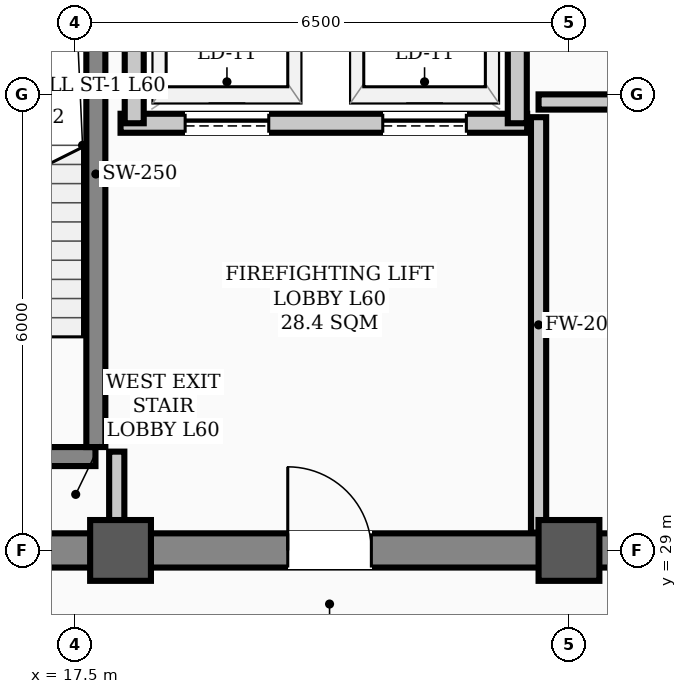
"""IFC4 building model, lengths in metres.
Left out: names, types, materials, properties, quantities, classifications, styles, units other than length and angle.
Written with IfcOpenShell. Run it as: python <this file> out.ifc"""

import sys

from ifc_helpers import new_model, si_unit, direction, frame, frame_2d, origin, origin_2d, place, context, subcontext, project, spatial, rectangle, hollow_rectangle, extrude, element, fill, save


model = new_model("IFC4")
c1 = context("Model", 3, precision=1e-05, world=origin(), true_north=direction((0.0, 1.0)))
c2 = subcontext(c1, "Body", "Model", "MODEL_VIEW")
j1 = project(units=[si_unit("LENGTHUNIT", "METRE"), si_unit("PLANEANGLEUNIT", "RADIAN")], contexts=[c1])
p1 = place(None, origin())
s1 = spatial("IfcSite", under=j1, at=p1, CompositionType="ELEMENT")
p2 = place(p1, origin())
s2 = spatial("IfcBuilding", under=s1, at=p2, CompositionType="ELEMENT")
p3 = place(p2, frame((0.0, 0.0, 242.3)))
s3 = spatial("IfcBuildingStorey", under=s2, at=p3, CompositionType="ELEMENT", Elevation=242.3)
for number, where, z_axis, x_axis in (
    (1, (18.1, 29.0, 0.0), (0.0, 0.0, 1.0), (1.0, 0.0, 0.0)),
    (2, (24.0, 29.0, 0.0), (0.0, 0.0, 1.0), (1.0, 0.0, 0.0)),
):
    element("IfcColumn", number, at=place(p3, frame(where, z_axis=z_axis, x_axis=x_axis)), inside=s3, PredefinedType="COLUMN", context=c2, shape_type="SweptSolid", body=[
        extrude(hollow_rectangle(XDim=0.8, YDim=0.8, WallThickness=0.032, InnerFilletRadius=0.016, OuterFilletRadius=0.048, at=origin_2d()), origin(), (0.0, 0.0, 1.0), 3.9),
    ])
p4 = place(p3, frame((13.5, 29.0, 0.0), z_axis=(0.0, 0.0, 1.0), x_axis=(1.0, 0.0, 0.0)))
e3 = element("IfcWall", 3, at=p4, inside=s3, PredefinedType="SHEAR", context=c2, shape_type="SweptSolid", body=[
    extrude(rectangle(XDim=30.5, YDim=0.45, at=frame_2d((15.25, 0.0))), origin(), (0.0, 0.0, 1.0), 3.72),
])
p5 = place(p4, frame((1.75, 0.0, 0.0)))
e4 = element("IfcOpeningElement", 4, at=p5, cuts=e3, PredefinedType="OPENING", context=c2, shape_type="SweptSolid", body=[
    extrude(rectangle(XDim=1.1, YDim=2.08, at=frame_2d((0.55, 1.04))), frame((0.0, 0.235, 0.0), z_axis=(0.0, -1.0, 0.0), x_axis=(1.0, 0.0, 0.0)), (0.0, 0.0, 1.0), 0.47),
])
p6 = place(p4, frame((26.7, 0.0, 0.0)))
e5 = element("IfcOpeningElement", 5, at=p6, cuts=e3, PredefinedType="OPENING", context=c2, shape_type="SweptSolid", body=[
    extrude(rectangle(XDim=1.1, YDim=2.08, at=frame_2d((0.55, 1.04))), frame((0.0, 0.235, 0.0), z_axis=(0.0, -1.0, 0.0), x_axis=(1.0, 0.0, 0.0)), (0.0, 0.0, 1.0), 0.47),
])
p7 = place(p4, frame((6.8, 0.0, 0.0)))
e6 = element("IfcOpeningElement", 6, at=p7, cuts=e3, PredefinedType="OPENING", context=c2, shape_type="SweptSolid", body=[
    extrude(rectangle(XDim=1.1, YDim=2.08, at=frame_2d((0.55, 1.04))), frame((0.0, 0.235, 0.0), z_axis=(0.0, -1.0, 0.0), x_axis=(1.0, 0.0, 0.0)), (0.0, 0.0, 1.0), 0.47),
])
p8 = place(p4, frame((13.2, 0.0, 0.0)))
e7 = element("IfcOpeningElement", 7, at=p8, cuts=e3, PredefinedType="OPENING", context=c2, shape_type="SweptSolid", body=[
    extrude(rectangle(XDim=1.6, YDim=2.08, at=frame_2d((0.8, 1.04))), frame((0.0, 0.235, 0.0), z_axis=(0.0, -1.0, 0.0), x_axis=(1.0, 0.0, 0.0)), (0.0, 0.0, 1.0), 0.47),
])
p9 = place(p4, frame((19.53, 0.0, 0.0)))
e8 = element("IfcOpeningElement", 8, at=p9, cuts=e3, PredefinedType="OPENING", context=c2, shape_type="SweptSolid", body=[
    extrude(rectangle(XDim=0.9, YDim=2.08, at=frame_2d((0.45, 1.04))), frame((0.0, 0.235, 0.0), z_axis=(0.0, -1.0, 0.0), x_axis=(1.0, 0.0, 0.0)), (0.0, 0.0, 1.0), 0.47),
])
p10 = place(p4, frame((21.57, 0.0, 0.0)))
e9 = element("IfcOpeningElement", 9, at=p10, cuts=e3, PredefinedType="OPENING", context=c2, shape_type="SweptSolid", body=[
    extrude(rectangle(XDim=0.9, YDim=2.08, at=frame_2d((0.45, 1.04))), frame((0.0, 0.235, 0.0), z_axis=(0.0, -1.0, 0.0), x_axis=(1.0, 0.0, 0.0)), (0.0, 0.0, 1.0), 0.47),
])
p11 = place(p3, frame((14.43, 30.235, 0.0), z_axis=(0.0, 0.0, 1.0), x_axis=(1.0, 0.0, 0.0)))
e10 = element("IfcWall", 10, at=p11, inside=s3, PredefinedType="STANDARD", context=c2, shape_type="SweptSolid", body=[
    extrude(rectangle(XDim=3.34, YDim=0.25, at=frame_2d((1.67, 0.0))), origin(), (0.0, 0.0, 1.0), 3.72),
])
p12 = place(p11, frame((1.1, 0.0, 0.0)))
e11 = element("IfcOpeningElement", 11, at=p12, cuts=e10, PredefinedType="OPENING", context=c2, shape_type="SweptSolid", body=[
    extrude(rectangle(XDim=1.1, YDim=2.08, at=frame_2d((0.55, 1.04))), frame((0.0, 0.135, 0.0), z_axis=(0.0, -1.0, 0.0), x_axis=(1.0, 0.0, 0.0)), (0.0, 0.0, 1.0), 0.27),
])
p13 = place(p3, frame((17.775, 30.36, 0.0), z_axis=(0.0, 0.0, 1.0), x_axis=(0.0, 1.0, 0.0)))
e12 = element("IfcWall", 12, at=p13, inside=s3, PredefinedType="STANDARD", context=c2, shape_type="SweptSolid", body=[
    extrude(rectangle(XDim=7.184, YDim=0.25, at=frame_2d((3.592, 0.0))), origin(), (0.0, 0.0, 1.0), 3.72),
])
p14 = place(p3, frame((18.1, 34.62, 0.0), z_axis=(0.0, 0.0, 1.0), x_axis=(1.0, 0.0, 0.0)))
e13 = element("IfcWall", 13, at=p14, inside=s3, PredefinedType="STANDARD", context=c2, shape_type="SweptSolid", body=[
    extrude(rectangle(XDim=5.35, YDim=0.25, at=frame_2d((2.675, 0.0))), origin(), (0.0, 0.0, 1.0), 3.72),
])
p15 = place(p14, frame((0.85, 0.0, 0.0)))
e14 = element("IfcOpeningElement", 14, at=p15, cuts=e13, PredefinedType="OPENING", context=c2, shape_type="SweptSolid", body=[
    extrude(rectangle(XDim=1.1, YDim=2.08, at=frame_2d((0.55, 1.04))), frame((0.0, 0.135, 0.0), z_axis=(0.0, -1.0, 0.0), x_axis=(1.0, 0.0, 0.0)), (0.0, 0.0, 1.0), 0.27),
])
p16 = place(p14, frame((3.45, 0.0, 0.0)))
e15 = element("IfcOpeningElement", 15, at=p16, cuts=e13, PredefinedType="OPENING", context=c2, shape_type="SweptSolid", body=[
    extrude(rectangle(XDim=1.1, YDim=2.08, at=frame_2d((0.55, 1.04))), frame((0.0, 0.135, 0.0), z_axis=(0.0, -1.0, 0.0), x_axis=(1.0, 0.0, 0.0)), (0.0, 0.0, 1.0), 0.27),
])
for number, where, z_axis, x_axis in (
    (16, (18.28, 34.62, 0.0), (0.0, 0.0, 1.0), (0.0, 1.0, 0.0)),
    (17, (23.32, 34.62, 0.0), (0.0, 0.0, 1.0), (0.0, 1.0, 0.0)),
):
    element("IfcWall", number, at=place(p3, frame(where, z_axis=z_axis, x_axis=x_axis)), inside=s3, PredefinedType="STANDARD", context=c2, shape_type="SweptSolid", body=[
        extrude(rectangle(XDim=3.33, YDim=0.25, at=frame_2d((1.665, 0.0))), origin(), (0.0, 0.0, 1.0), 3.72),
    ])
p17 = place(p3, frame((23.6, 34.9, 0.0), z_axis=(0.0, 0.0, 1.0), x_axis=(1.0, 0.0, 0.0)))
e18 = element("IfcWall", 18, at=p17, inside=s3, PredefinedType="STANDARD", context=c2, shape_type="SweptSolid", body=[
    extrude(rectangle(XDim=8.18, YDim=0.2, at=frame_2d((4.09, 0.0))), origin(), (0.0, 0.0, 1.0), 3.72),
])
p18 = place(p17, frame((3.45, 0.0, 0.0)))
e19 = element("IfcOpeningElement", 19, at=p18, cuts=e18, PredefinedType="OPENING", context=c2, shape_type="SweptSolid", body=[
    extrude(rectangle(XDim=1.1, YDim=2.08, at=frame_2d((0.55, 1.04))), frame((0.0, 0.11, 0.0), z_axis=(0.0, -1.0, 0.0), x_axis=(1.0, 0.0, 0.0)), (0.0, 0.0, 1.0), 0.22),
])
p19 = place(p3, frame((18.05, 29.235, 0.0), z_axis=(0.0, 0.0, 1.0), x_axis=(0.0, 1.0, 0.0)))
e20 = element("IfcWall", 20, at=p19, inside=s3, PredefinedType="STANDARD", context=c2, shape_type="SweptSolid", body=[
    extrude(rectangle(XDim=1.065, YDim=0.2, at=frame_2d((0.532, 0.0))), origin(), (0.0, 0.0, 1.0), 3.35),
])
p20 = place(p3, frame((23.6, 29.235, 0.0), z_axis=(0.0, 0.0, 1.0), x_axis=(0.0, 1.0, 0.0)))
e21 = element("IfcWall", 21, at=p20, inside=s3, PredefinedType="STANDARD", context=c2, shape_type="SweptSolid", body=[
    extrude(rectangle(XDim=5.465, YDim=0.2, at=frame_2d((2.732, 0.0))), origin(), (0.0, 0.0, 1.0), 3.2),
])
p21 = place(p7, origin())
e22 = element("IfcDoor", 22, at=p21, inside=s3, OperationType="SINGLE_SWING_LEFT", PredefinedType="DOOR", context=c2, shape_type="SweptSolid", body=[
    extrude(rectangle(XDim=1.1, YDim=2.08, at=frame_2d((0.55, 1.04))), frame((0.0, 0.025, 0.0), z_axis=(0.0, -1.0, 0.0), x_axis=(1.0, 0.0, 0.0)), (0.0, 0.0, 1.0), 0.05),
])
fill(e6, e22)
p22 = place(p15, origin())
e23 = element("IfcDoor", 23, at=p22, inside=s3, OperationType="SLIDING_TO_LEFT", PredefinedType="DOOR", context=c2, shape_type="SweptSolid", body=[
    extrude(rectangle(XDim=1.1, YDim=2.08, at=frame_2d((0.55, 1.04))), frame((0.0, 0.025, 0.0), z_axis=(0.0, -1.0, 0.0), x_axis=(1.0, 0.0, 0.0)), (0.0, 0.0, 1.0), 0.05),
])
fill(e14, e23)
p23 = place(p16, origin())
e24 = element("IfcDoor", 24, at=p23, inside=s3, OperationType="SLIDING_TO_LEFT", PredefinedType="DOOR", context=c2, shape_type="SweptSolid", body=[
    extrude(rectangle(XDim=1.1, YDim=2.08, at=frame_2d((0.55, 1.04))), frame((0.0, 0.025, 0.0), z_axis=(0.0, -1.0, 0.0), x_axis=(1.0, 0.0, 0.0)), (0.0, 0.0, 1.0), 0.05),
])
fill(e15, e24)
save(model, sys.argv[1])
